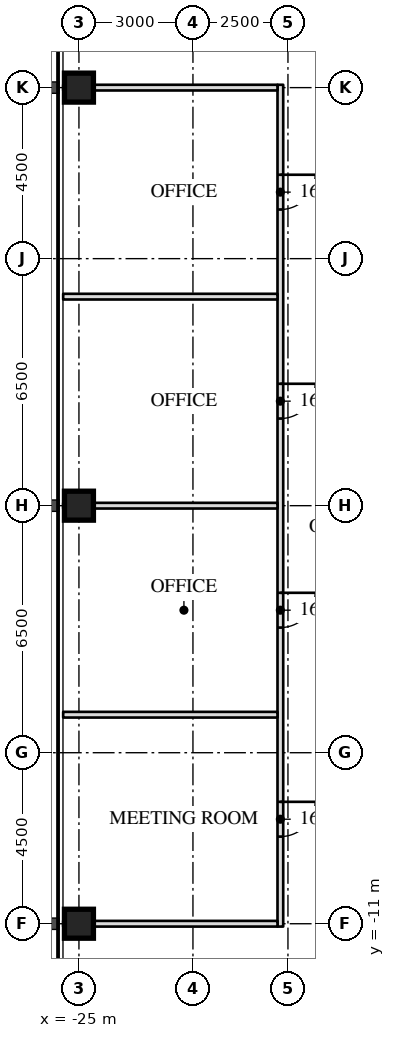
"""IFC4 building model, lengths in metres.
Left out: names, types, materials, properties, quantities, classifications, styles, units other than length and angle.
Written with IfcOpenShell. Run it as: python <this file> out.ifc"""

import sys

from ifc_helpers import new_model, si_unit, direction, frame, frame_2d, origin, origin_2d, place, context, subcontext, project, spatial, rectangle, hollow_rectangle, extrude, element, fill, save


model = new_model("IFC4")
c1 = context("Model", 3, precision=1e-05, world=origin(), true_north=direction((0.0, 1.0)))
c2 = subcontext(c1, "Body", "Model", "MODEL_VIEW")
j1 = project(units=[si_unit("LENGTHUNIT", "METRE"), si_unit("PLANEANGLEUNIT", "RADIAN")], contexts=[c1])
p1 = place(None, origin())
s1 = spatial("IfcSite", under=j1, at=p1, CompositionType="ELEMENT")
p2 = place(p1, origin())
s2 = spatial("IfcBuilding", under=s1, at=p2, CompositionType="ELEMENT")
p3 = place(p2, frame((0.0, 0.0, 69.3)))
s3 = spatial("IfcBuildingStorey", under=s2, at=p3, CompositionType="ELEMENT", Elevation=69.3)
for number, where, z_axis, x_axis in (
    (1, (-25.0, 0.0, 0.0), (0.0, 0.0, 1.0), (0.0, 1.0, 0.0)),
    (2, (-25.0, -11.0, 0.0), (0.0, 0.0, 1.0), (0.0, 1.0, 0.0)),
    (3, (-25.0, 11.0, 0.0), (0.0, 0.0, 1.0), (0.0, 1.0, 0.0)),
):
    element("IfcColumn", number, at=place(p3, frame(where, z_axis=z_axis, x_axis=x_axis)), inside=s3, PredefinedType="COLUMN", context=c2, shape_type="SweptSolid", body=[
        extrude(hollow_rectangle(XDim=0.762, YDim=0.762, WallThickness=0.127, at=origin_2d()), origin(), (0.0, 0.0, 1.0), 4.1),
    ])
p4 = place(p3, frame((-19.7, 11.075, 0.0), z_axis=(0.0, 0.0, 1.0), x_axis=(0.0, -1.0, 0.0)))
e4 = element("IfcWall", 4, at=p4, inside=s3, PredefinedType="PARTITIONING", context=c2, shape_type="SweptSolid", body=[
    extrude(rectangle(XDim=22.15, YDim=0.15, at=frame_2d((11.075, 0.0))), origin(), (0.0, 0.0, 1.0), 3.91),
])
p5 = place(p4, frame((2.367, 0.0, 0.0)))
e5 = element("IfcOpeningElement", 5, at=p5, cuts=e4, PredefinedType="OPENING", context=c2, shape_type="SweptSolid", body=[
    extrude(rectangle(XDim=0.915, YDim=2.134, at=frame_2d((0.458, 1.067))), frame((0.0, 0.085, 0.0), z_axis=(0.0, -1.0, 0.0), x_axis=(1.0, 0.0, 0.0)), (0.0, 0.0, 1.0), 0.17),
])
p6 = place(p4, frame((7.867, 0.0, 0.0)))
e6 = element("IfcOpeningElement", 6, at=p6, cuts=e4, PredefinedType="OPENING", context=c2, shape_type="SweptSolid", body=[
    extrude(rectangle(XDim=0.915, YDim=2.134, at=frame_2d((0.458, 1.067))), frame((0.0, 0.085, 0.0), z_axis=(0.0, -1.0, 0.0), x_axis=(1.0, 0.0, 0.0)), (0.0, 0.0, 1.0), 0.17),
])
p7 = place(p4, frame((13.367, 0.0, 0.0)))
e7 = element("IfcOpeningElement", 7, at=p7, cuts=e4, PredefinedType="OPENING", context=c2, shape_type="SweptSolid", body=[
    extrude(rectangle(XDim=0.915, YDim=2.134, at=frame_2d((0.458, 1.067))), frame((0.0, 0.085, 0.0), z_axis=(0.0, -1.0, 0.0), x_axis=(1.0, 0.0, 0.0)), (0.0, 0.0, 1.0), 0.17),
])
p8 = place(p4, frame((18.867, 0.0, 0.0)))
e8 = element("IfcOpeningElement", 8, at=p8, cuts=e4, PredefinedType="OPENING", context=c2, shape_type="SweptSolid", body=[
    extrude(rectangle(XDim=0.915, YDim=2.134, at=frame_2d((0.458, 1.067))), frame((0.0, 0.085, 0.0), z_axis=(0.0, -1.0, 0.0), x_axis=(1.0, 0.0, 0.0)), (0.0, 0.0, 1.0), 0.17),
])
p9 = place(p3, frame((-19.775, 11.0, 0.0), z_axis=(0.0, 0.0, 1.0), x_axis=(-1.0, 0.0, 0.0)))
e9 = element("IfcWall", 9, at=p9, inside=s3, PredefinedType="PARTITIONING", context=c2, shape_type="SweptSolid", body=[
    extrude(rectangle(XDim=5.64, YDim=0.15, at=frame_2d((2.82, 0.0))), origin(), (0.0, 0.0, 1.0), 3.13),
])
p10 = place(p3, frame((-19.775, 5.5, 0.0), z_axis=(0.0, 0.0, 1.0), x_axis=(-1.0, 0.0, 0.0)))
e10 = element("IfcWall", 10, at=p10, inside=s3, PredefinedType="PARTITIONING", context=c2, shape_type="SweptSolid", body=[
    extrude(rectangle(XDim=5.64, YDim=0.15, at=frame_2d((2.82, 0.0))), origin(), (0.0, 0.0, 1.0), 3.91),
])
p11 = place(p3, frame((-19.775, 0.0, 0.0), z_axis=(0.0, 0.0, 1.0), x_axis=(-1.0, 0.0, 0.0)))
e11 = element("IfcWall", 11, at=p11, inside=s3, PredefinedType="PARTITIONING", context=c2, shape_type="SweptSolid", body=[
    extrude(rectangle(XDim=5.64, YDim=0.15, at=frame_2d((2.82, 0.0))), origin(), (0.0, 0.0, 1.0), 3.13),
])
p12 = place(p3, frame((-19.775, -5.5, 0.0), z_axis=(0.0, 0.0, 1.0), x_axis=(-1.0, 0.0, 0.0)))
e12 = element("IfcWall", 12, at=p12, inside=s3, PredefinedType="PARTITIONING", context=c2, shape_type="SweptSolid", body=[
    extrude(rectangle(XDim=5.64, YDim=0.15, at=frame_2d((2.82, 0.0))), origin(), (0.0, 0.0, 1.0), 3.91),
])
p13 = place(p3, frame((-19.775, -11.0, 0.0), z_axis=(0.0, 0.0, 1.0), x_axis=(-1.0, 0.0, 0.0)))
e13 = element("IfcWall", 13, at=p13, inside=s3, PredefinedType="PARTITIONING", context=c2, shape_type="SweptSolid", body=[
    extrude(rectangle(XDim=5.64, YDim=0.15, at=frame_2d((2.82, 0.0))), origin(), (0.0, 0.0, 1.0), 3.13),
])
p14 = place(p5, origin())
e14 = element("IfcDoor", 14, at=p14, inside=s3, OperationType="SINGLE_SWING_LEFT", PredefinedType="DOOR", context=c2, shape_type="SweptSolid", body=[
    extrude(rectangle(XDim=0.915, YDim=2.134, at=frame_2d((0.458, 1.067))), frame((0.0, 0.025, 0.0), z_axis=(0.0, -1.0, 0.0), x_axis=(1.0, 0.0, 0.0)), (0.0, 0.0, 1.0), 0.05),
])
fill(e5, e14)
p15 = place(p6, origin())
e15 = element("IfcDoor", 15, at=p15, inside=s3, OperationType="SINGLE_SWING_LEFT", PredefinedType="DOOR", context=c2, shape_type="SweptSolid", body=[
    extrude(rectangle(XDim=0.915, YDim=2.134, at=frame_2d((0.458, 1.067))), frame((0.0, 0.025, 0.0), z_axis=(0.0, -1.0, 0.0), x_axis=(1.0, 0.0, 0.0)), (0.0, 0.0, 1.0), 0.05),
])
fill(e6, e15)
p16 = place(p7, origin())
e16 = element("IfcDoor", 16, at=p16, inside=s3, OperationType="SINGLE_SWING_LEFT", PredefinedType="DOOR", context=c2, shape_type="SweptSolid", body=[
    extrude(rectangle(XDim=0.915, YDim=2.134, at=frame_2d((0.458, 1.067))), frame((0.0, 0.025, 0.0), z_axis=(0.0, -1.0, 0.0), x_axis=(1.0, 0.0, 0.0)), (0.0, 0.0, 1.0), 0.05),
])
fill(e7, e16)
p17 = place(p8, origin())
e17 = element("IfcDoor", 17, at=p17, inside=s3, OperationType="SINGLE_SWING_LEFT", PredefinedType="DOOR", context=c2, shape_type="SweptSolid", body=[
    extrude(rectangle(XDim=0.915, YDim=2.134, at=frame_2d((0.458, 1.067))), frame((0.0, 0.025, 0.0), z_axis=(0.0, -1.0, 0.0), x_axis=(1.0, 0.0, 0.0)), (0.0, 0.0, 1.0), 0.05),
])
fill(e8, e17)
save(model, sys.argv[1])
